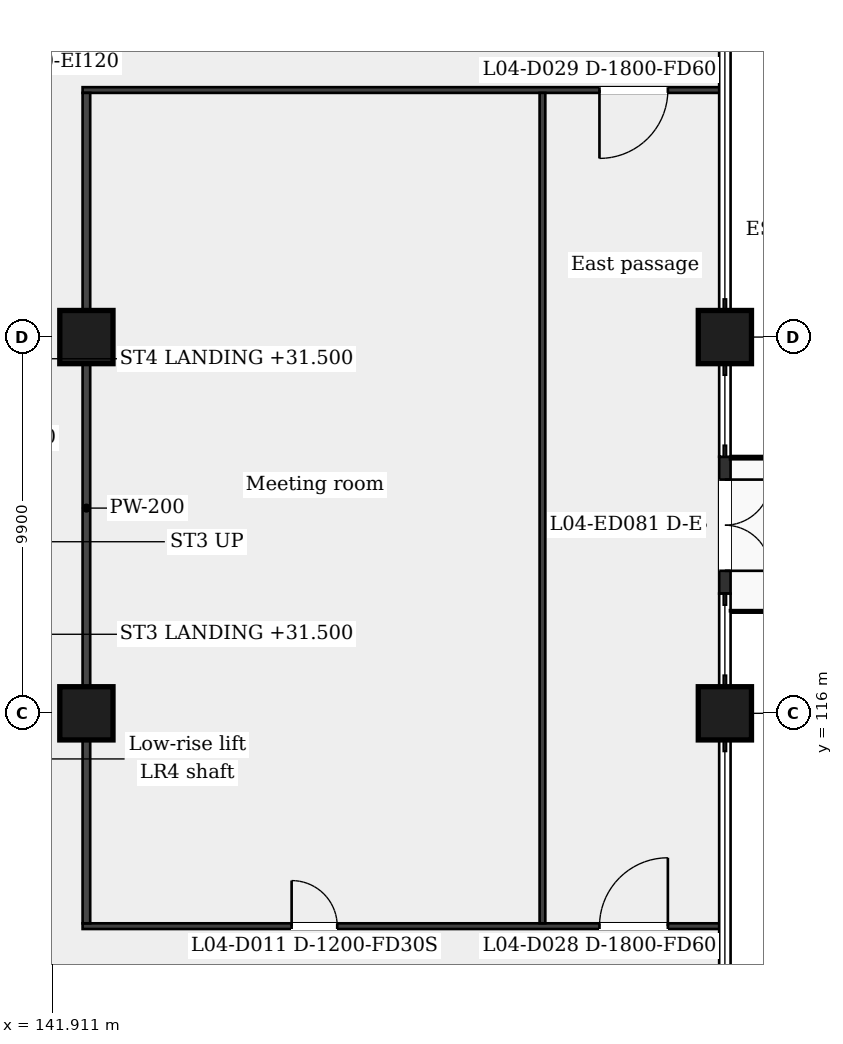
"""IFC4 building model, lengths in metres.
Left out: names, types, materials, properties, quantities, classifications, styles, units other than length and angle.
Written with IfcOpenShell. Run it as: python <this file> out.ifc"""

import sys

from ifc_helpers import new_model, si_unit, direction, frame, frame_2d, origin, origin_2d, place, context, subcontext, project, spatial, rectangle, extrude, element, fill, save


model = new_model("IFC4")
c1 = context("Model", 3, precision=1e-05, world=origin(), true_north=direction((0.0, 1.0)))
c2 = subcontext(c1, "Body", "Model", "MODEL_VIEW")
j1 = project(units=[si_unit("LENGTHUNIT", "METRE"), si_unit("PLANEANGLEUNIT", "RADIAN")], contexts=[c1])
p1 = place(None, origin())
s1 = spatial("IfcSite", under=j1, at=p1, CompositionType="ELEMENT")
p2 = place(p1, origin())
s2 = spatial("IfcBuilding", under=s1, at=p2, CompositionType="ELEMENT")
p3 = place(p2, frame((0.0, 0.0, 29.0)))
s3 = spatial("IfcBuildingStorey", under=s2, at=p3, CompositionType="ELEMENT", Elevation=29.0)
for number, where, z_axis, x_axis in (
    (1, (142.8, 116.0, 0.0), (0.0, 0.0, 1.0), (1.0, 0.0, 0.0)),
    (2, (159.6, 116.0, 0.0), (0.0, 0.0, 1.0), (1.0, 0.0, 0.0)),
    (3, (142.8, 125.9, 0.0), (0.0, 0.0, 1.0), (1.0, 0.0, 0.0)),
    (4, (159.6, 125.9, 0.0), (0.0, 0.0, 1.0), (1.0, 0.0, 0.0)),
):
    element("IfcColumn", number, at=place(p3, frame(where, z_axis=z_axis, x_axis=x_axis)), inside=s3, PredefinedType="COLUMN", context=c2, shape_type="SweptSolid", body=[
        extrude(rectangle(XDim=1.4, YDim=1.4, at=origin_2d()), origin(), (0.0, 0.0, 1.0), 5.0),
    ])
p4 = place(p3, frame((159.6, 122.75, 0.0), z_axis=(0.0, 0.0, 1.0), x_axis=(0.0, -1.0, 0.0)))
e5 = element("IfcWall", 5, at=p4, inside=s3, PredefinedType="SOLIDWALL", context=c2, shape_type="SweptSolid", body=[
    extrude(rectangle(XDim=3.6, YDim=0.3, at=frame_2d((1.8, 0.0))), origin(), (0.0, 0.0, 1.0), 4.4),
])
p5 = place(p4, frame((0.6, 0.0, 0.0)))
e6 = element("IfcOpeningElement", 6, at=p5, cuts=e5, PredefinedType="OPENING", context=c2, shape_type="SweptSolid", body=[
    extrude(rectangle(XDim=2.4, YDim=2.4, at=frame_2d((1.2, 1.2))), frame((0.0, 0.16, 0.0), z_axis=(0.0, -1.0, 0.0), x_axis=(1.0, 0.0, 0.0)), (0.0, 0.0, 1.0), 0.32),
])
p6 = place(p3, frame((142.7, 110.4, 0.0), z_axis=(0.0, 0.0, 1.0), x_axis=(1.0, 0.0, 0.0)))
e7 = element("IfcWall", 7, at=p6, inside=s3, PredefinedType="PARTITIONING", context=c2, shape_type="SweptSolid", body=[
    extrude(rectangle(XDim=16.85, YDim=0.15, at=frame_2d((8.425, 0.0))), origin(), (0.0, 0.0, 1.0), 4.4),
])
p7 = place(p6, frame((5.5, 0.0, 0.0)))
e8 = element("IfcOpeningElement", 8, at=p7, cuts=e7, PredefinedType="OPENING", context=c2, shape_type="SweptSolid", body=[
    extrude(rectangle(XDim=1.2, YDim=2.1, at=frame_2d((0.6, 1.05))), frame((0.0, 0.085, 0.0), z_axis=(0.0, -1.0, 0.0), x_axis=(1.0, 0.0, 0.0)), (0.0, 0.0, 1.0), 0.17),
])
p8 = place(p6, frame((13.6, 0.0, 0.0)))
e9 = element("IfcOpeningElement", 9, at=p8, cuts=e7, PredefinedType="OPENING", context=c2, shape_type="SweptSolid", body=[
    extrude(rectangle(XDim=1.8, YDim=2.1, at=frame_2d((0.9, 1.05))), frame((0.0, 0.085, 0.0), z_axis=(0.0, -1.0, 0.0), x_axis=(1.0, 0.0, 0.0)), (0.0, 0.0, 1.0), 0.17),
])
p9 = place(p3, frame((142.7, 132.4, 0.0), z_axis=(0.0, 0.0, 1.0), x_axis=(1.0, 0.0, 0.0)))
e10 = element("IfcWall", 10, at=p9, inside=s3, PredefinedType="PARTITIONING", context=c2, shape_type="SweptSolid", body=[
    extrude(rectangle(XDim=16.85, YDim=0.15, at=frame_2d((8.425, 0.0))), origin(), (0.0, 0.0, 1.0), 4.4),
])
p10 = place(p9, frame((13.6, 0.0, 0.0)))
e11 = element("IfcOpeningElement", 11, at=p10, cuts=e10, PredefinedType="OPENING", context=c2, shape_type="SweptSolid", body=[
    extrude(rectangle(XDim=1.8, YDim=2.1, at=frame_2d((0.9, 1.05))), frame((0.0, 0.085, 0.0), z_axis=(0.0, -1.0, 0.0), x_axis=(1.0, 0.0, 0.0)), (0.0, 0.0, 1.0), 0.17),
])
p11 = place(p3, frame((142.8, 110.475, 0.0), z_axis=(0.0, 0.0, 1.0), x_axis=(0.0, 1.0, 0.0)))
e12 = element("IfcWall", 12, at=p11, inside=s3, PredefinedType="PARTITIONING", context=c2, shape_type="SweptSolid", body=[
    extrude(rectangle(XDim=21.85, YDim=0.2, at=frame_2d((10.925, 0.0))), origin(), (0.0, 0.0, 1.0), 4.4),
])
p12 = place(p3, frame((154.8, 110.475, 0.0), z_axis=(0.0, 0.0, 1.0), x_axis=(0.0, 1.0, 0.0)))
e13 = element("IfcWall", 13, at=p12, inside=s3, PredefinedType="PARTITIONING", context=c2, shape_type="SweptSolid", body=[
    extrude(rectangle(XDim=21.85, YDim=0.15, at=frame_2d((10.925, 0.0))), origin(), (0.0, 0.0, 1.0), 4.4),
])
p13 = place(p5, origin())
e14 = element("IfcDoor", 14, at=p13, inside=s3, OperationType="DOUBLE_DOOR_DOUBLE_SWING", PredefinedType="DOOR", context=c2, shape_type="SweptSolid", body=[
    extrude(rectangle(XDim=2.4, YDim=2.4, at=frame_2d((1.2, 1.2))), frame((0.0, 0.025, 0.0), z_axis=(0.0, -1.0, 0.0), x_axis=(1.0, 0.0, 0.0)), (0.0, 0.0, 1.0), 0.05),
])
fill(e6, e14)
p14 = place(p7, origin())
e15 = element("IfcDoor", 15, at=p14, inside=s3, OperationType="SINGLE_SWING_LEFT", PredefinedType="DOOR", context=c2, shape_type="SweptSolid", body=[
    extrude(rectangle(XDim=1.2, YDim=2.1, at=frame_2d((0.6, 1.05))), frame((0.0, 0.025, 0.0), z_axis=(0.0, -1.0, 0.0), x_axis=(1.0, 0.0, 0.0)), (0.0, 0.0, 1.0), 0.05),
])
fill(e8, e15)
p15 = place(p8, origin())
e16 = element("IfcDoor", 16, at=p15, inside=s3, OperationType="SINGLE_SWING_RIGHT", PredefinedType="DOOR", context=c2, shape_type="SweptSolid", body=[
    extrude(rectangle(XDim=1.8, YDim=2.1, at=frame_2d((0.9, 1.05))), frame((0.0, 0.025, 0.0), z_axis=(0.0, -1.0, 0.0), x_axis=(1.0, 0.0, 0.0)), (0.0, 0.0, 1.0), 0.05),
])
fill(e9, e16)
p16 = place(p10, origin())
e17 = element("IfcDoor", 17, at=p16, inside=s3, OperationType="SINGLE_SWING_LEFT", PredefinedType="DOOR", context=c2, shape_type="SweptSolid", body=[
    extrude(rectangle(XDim=1.8, YDim=2.1, at=frame_2d((0.9, 1.05))), frame((0.0, 0.025, 0.0), z_axis=(0.0, -1.0, 0.0), x_axis=(1.0, 0.0, 0.0)), (0.0, 0.0, 1.0), 0.05),
])
fill(e11, e17)
save(model, sys.argv[1])
